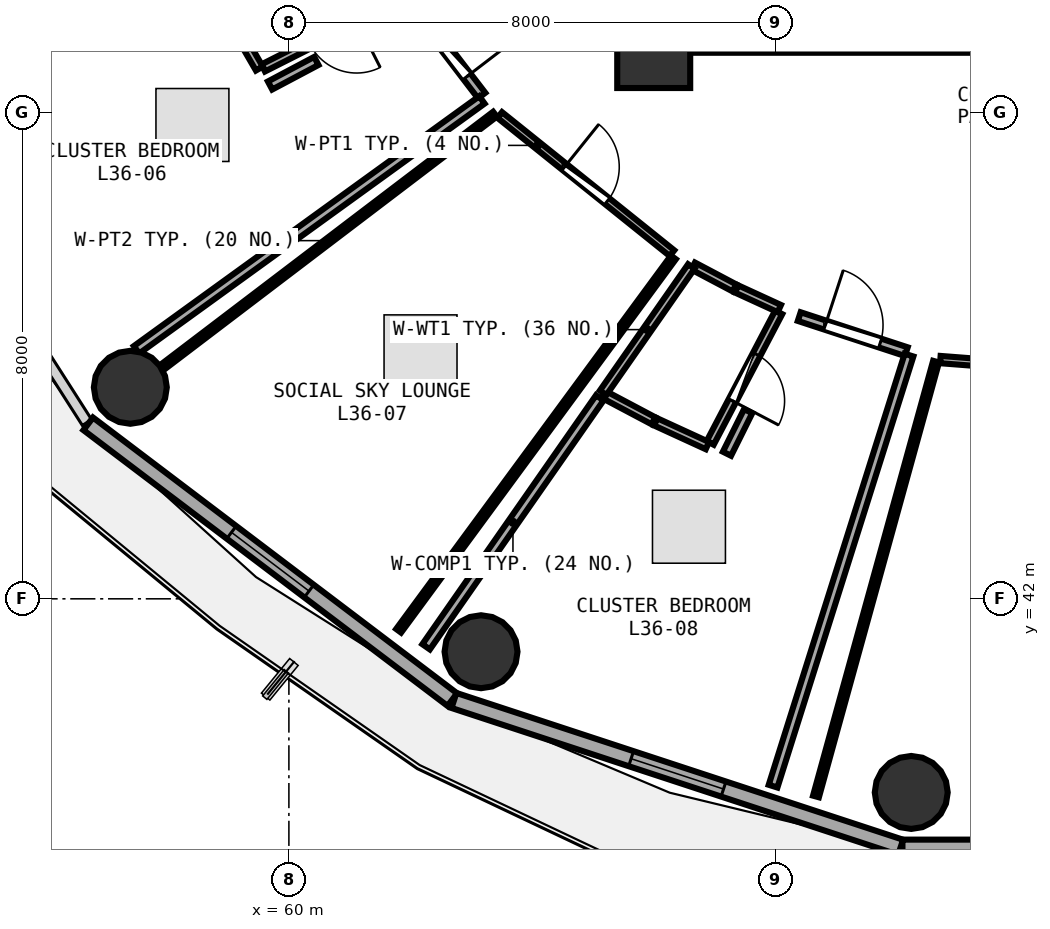
"""IFC4 building model, lengths in metres.
Left out: names, types, materials, properties, quantities, classifications, styles, units other than length and angle.
Written with IfcOpenShell. Run it as: python <this file> out.ifc"""

import sys

from ifc_helpers import new_model, si_unit, direction, frame, frame_2d, origin, origin_2d, place, context, subcontext, project, spatial, rectangle, circle, extrude, element, fill, save


model = new_model("IFC4")
c1 = context("Model", 3, precision=1e-05, world=origin(), true_north=direction((0.0, 1.0)))
c2 = subcontext(c1, "Body", "Model", "MODEL_VIEW")
j1 = project(units=[si_unit("LENGTHUNIT", "METRE"), si_unit("PLANEANGLEUNIT", "RADIAN")], contexts=[c1])
p1 = place(None, origin())
s1 = spatial("IfcSite", under=j1, at=p1, CompositionType="ELEMENT")
p2 = place(p1, origin())
s2 = spatial("IfcBuilding", under=s1, at=p2, CompositionType="ELEMENT")
p3 = place(p2, frame((0.0, 0.0, 143.1)))
s3 = spatial("IfcBuildingStorey", under=s2, at=p3, CompositionType="ELEMENT", Elevation=143.1)
p4 = place(p3, frame((66.0, 51.0, 0.0), z_axis=(0.0, 0.0, 1.0), x_axis=(1.0, 0.0, 0.0)))
e1 = element("IfcColumn", 1, at=p4, inside=s3, PredefinedType="PILASTER", context=c2, shape_type="SweptSolid", body=[
    extrude(rectangle(XDim=1.2, YDim=1.2, at=origin_2d()), origin(), (0.0, 0.0, 1.0), 3.75),
])
for number, where, z_axis, x_axis in (
    (2, (57.392, 45.479, 0.0), (0.0, 0.0, 1.0), (1.0, 0.0, 0.0)),
    (3, (63.16, 41.13, 0.0), (0.0, 0.0, 1.0), (1.0, 0.0, 0.0)),
    (4, (70.235, 38.816, 0.0), (0.0, 0.0, 1.0), (1.0, 0.0, 0.0)),
):
    element("IfcColumn", number, at=place(p3, frame(where, z_axis=z_axis, x_axis=x_axis)), inside=s3, PredefinedType="COLUMN", context=c2, shape_type="SweptSolid", body=[
        extrude(circle(Radius=0.6, at=origin_2d()), origin(), (0.0, 0.0, 1.0), 3.75),
    ])
p5 = place(p3, frame((56.699, 44.878, 0.0), z_axis=(0.0, 0.0, 1.0), x_axis=(0.797163719609, -0.603763202042, 0.0)))
e5 = element("IfcWall", 5, at=p5, inside=s3, PredefinedType="SOLIDWALL", context=c2, shape_type="SweptSolid", body=[
    extrude(rectangle(XDim=7.512, YDim=0.26, at=frame_2d((3.756, 0.0))), origin(), (0.0, 0.0, 1.0), 3.475),
])
p6 = place(p5, frame((2.956, 0.0, 0.85)))
e6 = element("IfcOpeningElement", 6, at=p6, cuts=e5, PredefinedType="OPENING", context=c2, shape_type="SweptSolid", body=[
    extrude(rectangle(XDim=1.6, YDim=1.45, at=frame_2d((0.8, 0.725))), frame((0.0, 0.14, 0.0), z_axis=(0.0, -1.0, 0.0), x_axis=(1.0, 0.0, 0.0)), (0.0, 0.0, 1.0), 0.28),
])
p7 = place(p3, frame((62.714, 40.328, 0.0), z_axis=(0.0, 0.0, 1.0), x_axis=(0.950038302428, -0.312133343173, 0.0)))
e7 = element("IfcWall", 7, at=p7, inside=s3, PredefinedType="SOLIDWALL", context=c2, shape_type="SweptSolid", body=[
    extrude(rectangle(XDim=7.733, YDim=0.26, at=frame_2d((3.867, 0.0))), origin(), (0.0, 0.0, 1.0), 3.475),
])
p8 = place(p7, frame((3.067, 0.0, 0.85)))
e8 = element("IfcOpeningElement", 8, at=p8, cuts=e7, PredefinedType="OPENING", context=c2, shape_type="SweptSolid", body=[
    extrude(rectangle(XDim=1.6, YDim=1.45, at=frame_2d((0.8, 0.725))), frame((0.0, 0.14, 0.0), z_axis=(0.0, -1.0, 0.0), x_axis=(1.0, 0.0, 0.0)), (0.0, 0.0, 1.0), 0.28),
])
p9 = place(p3, frame((70.091, 37.91, 0.0), z_axis=(0.0, 0.0, 1.0), x_axis=(1.0, 0.0, 0.0)))
e9 = element("IfcWall", 9, at=p9, inside=s3, PredefinedType="SOLIDWALL", context=c2, shape_type="SweptSolid", body=[
    extrude(rectangle(XDim=7.819, YDim=0.26, at=frame_2d((3.909, 0.0))), origin(), (0.0, 0.0, 1.0), 3.475),
])
p10 = place(p9, frame((3.434, 0.0, 0.0)))
e10 = element("IfcOpeningElement", 10, at=p10, cuts=e9, PredefinedType="OPENING", context=c2, shape_type="SweptSolid", body=[
    extrude(rectangle(XDim=0.95, YDim=2.1, at=frame_2d((0.475, 1.05))), frame((0.0, 0.14, 0.0), z_axis=(0.0, -1.0, 0.0), x_axis=(1.0, 0.0, 0.0)), (0.0, 0.0, 1.0), 0.28),
])
p11 = place(p9, frame((4.734, 0.0, 0.85)))
e11 = element("IfcOpeningElement", 11, at=p11, cuts=e9, PredefinedType="OPENING", context=c2, shape_type="SweptSolid", body=[
    extrude(rectangle(XDim=1.2, YDim=1.45, at=frame_2d((0.6, 0.725))), frame((0.0, 0.14, 0.0), z_axis=(0.0, -1.0, 0.0), x_axis=(1.0, 0.0, 0.0)), (0.0, 0.0, 1.0), 0.28),
])
p12 = place(p3, frame((66.26, 51.08, 0.0), z_axis=(0.0, 0.0, 1.0), x_axis=(1.0, 0.0, 0.0)))
e12 = element("IfcWall", 12, at=p12, inside=s3, PredefinedType="SHEAR", context=c2, shape_type="SweptSolid", body=[
    extrude(rectangle(XDim=7.16, YDim=0.2, at=frame_2d((3.58, 0.0))), origin(), (0.0, 0.0, 1.0), 3.49),
])
p13 = place(p3, frame((70.714, 45.934, 0.0), z_axis=(0.0, 0.0, 1.0), x_axis=(0.99702766625, -0.077044355613, 0.0)))
e13 = element("IfcWall", 13, at=p13, inside=s3, PredefinedType="PARTITIONING", context=c2, shape_type="SweptSolid", body=[
    extrude(rectangle(XDim=4.24, YDim=0.12, at=frame_2d((2.12, 0.0))), origin(), (0.0, 0.0, 1.0), 2.975),
])
p14 = place(p13, frame((1.67, 0.0, 0.0)))
e14 = element("IfcOpeningElement", 14, at=p14, cuts=e13, PredefinedType="OPENING", context=c2, shape_type="SweptSolid", body=[
    extrude(rectangle(XDim=0.9, YDim=2.08, at=frame_2d((0.45, 1.04))), frame((0.0, 0.07, 0.0), z_axis=(0.0, -1.0, 0.0), x_axis=(1.0, 0.0, 0.0)), (0.0, 0.0, 1.0), 0.14),
])
p15 = place(p3, frame((61.883, 51.895, 0.0), z_axis=(0.0, 0.0, 1.0), x_axis=(-0.892490597906, -0.451065995891, 0.0)))
e15 = element("IfcWall", 15, at=p15, inside=s3, PredefinedType="PLUMBINGWALL", context=c2, shape_type="SweptSolid", body=[
    extrude(rectangle(XDim=2.583, YDim=0.13, at=frame_2d((1.292, 0.0))), origin(), (0.0, 0.0, 1.0), 2.975),
])
p16 = place(p15, frame((0.861, 0.0, 0.0)))
e16 = element("IfcOpeningElement", 16, at=p16, cuts=e15, PredefinedType="OPENING", context=c2, shape_type="SweptSolid", body=[
    extrude(rectangle(XDim=0.86, YDim=2.05, at=frame_2d((0.43, 1.025))), frame((0.0, 0.075, 0.0), z_axis=(0.0, -1.0, 0.0), x_axis=(1.0, 0.0, 0.0)), (0.0, 0.0, 1.0), 0.15),
])
p17 = place(p3, frame((62.111, 51.658, 0.0), z_axis=(0.0, 0.0, 1.0), x_axis=(0.608307977949, -0.793701079729, 0.0)))
e17 = element("IfcWall", 17, at=p17, inside=s3, PredefinedType="PARTITIONING", context=c2, shape_type="SweptSolid", body=[
    extrude(rectangle(XDim=1.742, YDim=0.15, at=frame_2d((0.871, 0.0))), origin(), (0.0, 0.0, 1.0), 2.975),
])
p18 = place(p17, frame((0.396, 0.0, 0.0)))
e18 = element("IfcOpeningElement", 18, at=p18, cuts=e17, PredefinedType="OPENING", context=c2, shape_type="SweptSolid", body=[
    extrude(rectangle(XDim=0.95, YDim=2.08, at=frame_2d((0.475, 1.04))), frame((0.0, 0.085, 0.0), z_axis=(0.0, -1.0, 0.0), x_axis=(1.0, 0.0, 0.0)), (0.0, 0.0, 1.0), 0.17),
])
p19 = place(p3, frame((63.468, 49.957, 0.0), z_axis=(0.0, 0.0, 1.0), x_axis=(0.78006790059, -0.625694870099, 0.0)))
e19 = element("IfcWall", 19, at=p19, inside=s3, PredefinedType="PARTITIONING", context=c2, shape_type="SweptSolid", body=[
    extrude(rectangle(XDim=3.631, YDim=0.12, at=frame_2d((1.815, 0.0))), origin(), (0.0, 0.0, 1.0), 2.975),
])
p20 = place(p19, frame((1.366, 0.0, 0.0)))
e20 = element("IfcOpeningElement", 20, at=p20, cuts=e19, PredefinedType="OPENING", context=c2, shape_type="SweptSolid", body=[
    extrude(rectangle(XDim=0.9, YDim=2.08, at=frame_2d((0.45, 1.04))), frame((0.0, 0.07, 0.0), z_axis=(0.0, -1.0, 0.0), x_axis=(1.0, 0.0, 0.0)), (0.0, 0.0, 1.0), 0.14),
])
p21 = place(p3, frame((68.056, 46.712, 0.0), z_axis=(0.0, 0.0, 1.0), x_axis=(-0.464721454244, -0.885456927222, 0.0)))
e21 = element("IfcWall", 21, at=p21, inside=s3, PredefinedType="PLUMBINGWALL", context=c2, shape_type="SweptSolid", body=[
    extrude(rectangle(XDim=2.426, YDim=0.13, at=frame_2d((1.213, 0.0))), origin(), (0.0, 0.0, 1.0), 3.175),
])
p22 = place(p21, frame((0.783, 0.0, 0.0)))
e22 = element("IfcOpeningElement", 22, at=p22, cuts=e21, PredefinedType="OPENING", context=c2, shape_type="SweptSolid", body=[
    extrude(rectangle(XDim=0.86, YDim=2.05, at=frame_2d((0.43, 1.025))), frame((0.0, 0.075, 0.0), z_axis=(0.0, -1.0, 0.0), x_axis=(1.0, 0.0, 0.0)), (0.0, 0.0, 1.0), 0.15),
])
p23 = place(p3, frame((68.393, 46.641, 0.0), z_axis=(0.0, 0.0, 1.0), x_axis=(0.950343295829, -0.311203502668, 0.0)))
e23 = element("IfcWall", 23, at=p23, inside=s3, PredefinedType="PARTITIONING", context=c2, shape_type="SweptSolid", body=[
    extrude(rectangle(XDim=1.853, YDim=0.15, at=frame_2d((0.927, 0.0))), origin(), (0.0, 0.0, 1.0), 3.48),
])
p24 = place(p23, frame((0.451, 0.0, 0.0)))
e24 = element("IfcOpeningElement", 24, at=p24, cuts=e23, PredefinedType="OPENING", context=c2, shape_type="SweptSolid", body=[
    extrude(rectangle(XDim=0.95, YDim=2.08, at=frame_2d((0.475, 1.04))), frame((0.0, 0.085, 0.0), z_axis=(0.0, -1.0, 0.0), x_axis=(1.0, 0.0, 0.0)), (0.0, 0.0, 1.0), 0.17),
])
p25 = place(p3, frame((68.669, 38.75, 0.0), z_axis=(0.0, 0.0, 1.0), x_axis=(0.26617364863, 0.963925095002, 0.0)))
e25 = element("IfcWall", 25, at=p25, inside=s3, PredefinedType="PARTITIONING", context=c2, shape_type="SweptSolid", body=[
    extrude(rectangle(XDim=7.418, YDim=0.1, at=frame_2d((3.709, 0.0))), origin(), (0.0, 0.0, 1.0), 3.025),
])
p26 = place(p3, frame((59.514, 50.72, 0.0), z_axis=(0.0, 0.0, 1.0), x_axis=(-0.501222652689, 0.865318353227, 0.0)))
e26 = element("IfcWall", 26, at=p26, inside=s3, PredefinedType="PLUMBINGWALL", context=c2, shape_type="SweptSolid", body=[
    extrude(rectangle(XDim=0.878, YDim=0.13, at=frame_2d((0.439, 0.0))), origin(), (0.0, 0.0, 1.0), 2.975),
])
p27 = place(p3, frame((63.175, 50.205, 0.0), z_axis=(0.0, 0.0, 1.0), x_axis=(-0.810227225477, -0.586115895618, 0.0)))
e27 = element("IfcWall", 27, at=p27, inside=s3, PredefinedType="PARTITIONING", context=c2, shape_type="SweptSolid", body=[
    extrude(rectangle(XDim=7.011, YDim=0.15, at=frame_2d((3.506, 0.0))), origin(), (0.0, 0.0, 1.0), 3.175),
])
p28 = place(p3, frame((53.624, 50.438, 0.0), z_axis=(0.0, 0.0, 1.0), x_axis=(0.937175901168, 0.348857177468, 0.0)))
e28 = element("IfcWall", 28, at=p28, inside=s3, PredefinedType="PARTITIONING", context=c2, shape_type="SweptSolid", body=[
    extrude(rectangle(XDim=5.292, YDim=0.15, at=frame_2d((2.646, 0.0))), origin(), (0.0, 0.0, 1.0), 2.975),
])
p29 = place(p3, frame((59.69, 50.442, 0.0), z_axis=(0.0, 0.0, 1.0), x_axis=(0.883456769574, 0.468512685308, 0.0)))
e29 = element("IfcWall", 29, at=p29, inside=s3, PredefinedType="PARTITIONING", context=c2, shape_type="SweptSolid", body=[
    extrude(rectangle(XDim=0.861, YDim=0.15, at=frame_2d((0.431, 0.0))), origin(), (0.0, 0.0, 1.0), 3.48),
])
p30 = place(p3, frame((66.323, 47.615, 0.0), z_axis=(0.0, 0.0, 1.0), x_axis=(-0.592678959784, -0.805438793845, 0.0)))
e30 = element("IfcWall", 30, at=p30, inside=s3, PredefinedType="PARTITIONING", context=c2, shape_type="SweptSolid", body=[
    extrude(rectangle(XDim=7.624, YDim=0.1, at=frame_2d((3.812, 0.0))), origin(), (0.0, 0.0, 1.0), 2.975),
])
p31 = place(p3, frame((57.921, 45.811, 0.0), z_axis=(0.0, 0.0, 1.0), x_axis=(0.79595600815, 0.60535446896, 0.0)))
e31 = element("IfcWall", 31, at=p31, inside=s3, PredefinedType="PARTITIONING", context=c2, shape_type="SweptSolid", body=[
    extrude(rectangle(XDim=6.869, YDim=0.1, at=frame_2d((3.435, 0.0))), origin(), (0.0, 0.0, 1.0), 2.975),
])
p32 = place(p3, frame((66.648, 47.473, 0.0), z_axis=(0.0, 0.0, 1.0), x_axis=(0.884034960309, -0.467420783611, 0.0)))
e32 = element("IfcWall", 32, at=p32, inside=s3, PredefinedType="PLUMBINGWALL", context=c2, shape_type="SweptSolid", body=[
    extrude(rectangle(XDim=0.769, YDim=0.13, at=frame_2d((0.384, 0.0))), origin(), (0.0, 0.0, 1.0), 3.235),
])
p33 = place(p3, frame((67.363, 47.096, 0.0), z_axis=(0.0, 0.0, 1.0), x_axis=(0.908835433781, -0.417154832531, 0.0)))
e33 = element("IfcWall", 33, at=p33, inside=s3, PredefinedType="PLUMBINGWALL", context=c2, shape_type="SweptSolid", body=[
    extrude(rectangle(XDim=0.773, YDim=0.13, at=frame_2d((0.387, 0.0))), origin(), (0.0, 0.0, 1.0), 3.235),
])
p34 = place(p3, frame((66.883, 44.519, 0.0), z_axis=(0.0, 0.0, 1.0), x_axis=(-0.90885062215, 0.417121740763, 0.0)))
e34 = element("IfcWall", 34, at=p34, inside=s3, PredefinedType="PLUMBINGWALL", context=c2, shape_type="SweptSolid", body=[
    extrude(rectangle(XDim=0.936, YDim=0.13, at=frame_2d((0.468, 0.0))), origin(), (0.0, 0.0, 1.0), 3.175),
])
p35 = place(p3, frame((65.996, 44.927, 0.0), z_axis=(0.0, 0.0, 1.0), x_axis=(-0.88373041627, 0.46799631554, 0.0)))
e35 = element("IfcWall", 35, at=p35, inside=s3, PredefinedType="PLUMBINGWALL", context=c2, shape_type="SweptSolid", body=[
    extrude(rectangle(XDim=0.93, YDim=0.13, at=frame_2d((0.465, 0.0))), origin(), (0.0, 0.0, 1.0), 3.175),
])
p36 = place(p3, frame((65.168, 45.388, 0.0), z_axis=(0.0, 0.0, 1.0), x_axis=(0.572452908282, 0.819937599943, 0.0)))
e36 = element("IfcWall", 36, at=p36, inside=s3, PredefinedType="PLUMBINGWALL", context=c2, shape_type="SweptSolid", body=[
    extrude(rectangle(XDim=2.533, YDim=0.13, at=frame_2d((1.267, 0.0))), origin(), (0.0, 0.0, 1.0), 3.235),
])
p37 = place(p3, frame((70.199, 46.008, 0.0), z_axis=(0.0, 0.0, 1.0), x_axis=(-0.300834252316, -0.953676440222, 0.0)))
e37 = element("IfcWall", 37, at=p37, inside=s3, PredefinedType="PARTITIONING", context=c2, shape_type="SweptSolid", body=[
    extrude(rectangle(XDim=7.433, YDim=0.15, at=frame_2d((3.716, 0.0))), origin(), (0.0, 0.0, 1.0), 3.025),
])
p38 = place(p3, frame((62.257, 41.211, 0.0), z_axis=(0.0, 0.0, 1.0), x_axis=(0.572125752908, 0.820165911789, 0.0)))
e38 = element("IfcWall", 38, at=p38, inside=s3, PredefinedType="PARTITIONING", context=c2, shape_type="SweptSolid", body=[
    extrude(rectangle(XDim=4.992, YDim=0.15, at=frame_2d((2.496, 0.0))), origin(), (0.0, 0.0, 1.0), 2.975),
])
p39 = place(p3, frame((67.205, 44.386, 0.0), z_axis=(0.0, 0.0, 1.0), x_axis=(0.445215718224, 0.89542334359, 0.0)))
e39 = element("IfcWall", 39, at=p39, inside=s3, PredefinedType="PARTITIONING", context=c2, shape_type="SweptSolid", body=[
    extrude(rectangle(XDim=0.782, YDim=0.15, at=frame_2d((0.391, 0.0))), origin(), (0.0, 0.0, 1.0), 3.175),
])
p40 = place(p6, origin())
e40 = element("IfcWindow", 40, at=p40, inside=s3, PartitioningType="SINGLE_PANEL", PredefinedType="WINDOW", context=c2, shape_type="SweptSolid", body=[
    extrude(rectangle(XDim=1.6, YDim=1.45, at=frame_2d((0.8, 0.725))), frame((0.0, 0.03, 0.0), z_axis=(0.0, -1.0, 0.0), x_axis=(1.0, 0.0, 0.0)), (0.0, 0.0, 1.0), 0.06),
])
fill(e6, e40)
p41 = place(p8, origin())
e41 = element("IfcWindow", 41, at=p41, inside=s3, PartitioningType="SINGLE_PANEL", PredefinedType="WINDOW", context=c2, shape_type="SweptSolid", body=[
    extrude(rectangle(XDim=1.6, YDim=1.45, at=frame_2d((0.8, 0.725))), frame((0.0, 0.03, 0.0), z_axis=(0.0, -1.0, 0.0), x_axis=(1.0, 0.0, 0.0)), (0.0, 0.0, 1.0), 0.06),
])
fill(e8, e41)
p42 = place(p18, origin())
e42 = element("IfcDoor", 42, at=p42, inside=s3, OperationType="SINGLE_SWING_RIGHT", PredefinedType="DOOR", context=c2, shape_type="SweptSolid", body=[
    extrude(rectangle(XDim=0.95, YDim=2.08, at=frame_2d((0.475, 1.04))), frame((0.0, 0.025, 0.0), z_axis=(0.0, -1.0, 0.0), x_axis=(1.0, 0.0, 0.0)), (0.0, 0.0, 1.0), 0.05),
])
fill(e18, e42)
p43 = place(p20, origin())
e43 = element("IfcDoor", 43, at=p43, inside=s3, OperationType="SINGLE_SWING_LEFT", PredefinedType="DOOR", context=c2, shape_type="SweptSolid", body=[
    extrude(rectangle(XDim=0.9, YDim=2.08, at=frame_2d((0.45, 1.04))), frame((0.0, 0.025, 0.0), z_axis=(0.0, -1.0, 0.0), x_axis=(1.0, 0.0, 0.0)), (0.0, 0.0, 1.0), 0.05),
])
fill(e20, e43)
p44 = place(p22, origin())
e44 = element("IfcDoor", 44, at=p44, inside=s3, OperationType="SINGLE_SWING_RIGHT", PredefinedType="DOOR", context=c2, shape_type="SweptSolid", body=[
    extrude(rectangle(XDim=0.86, YDim=2.05, at=frame_2d((0.43, 1.025))), frame((0.0, 0.025, 0.0), z_axis=(0.0, -1.0, 0.0), x_axis=(1.0, 0.0, 0.0)), (0.0, 0.0, 1.0), 0.05),
])
fill(e22, e44)
p45 = place(p24, origin())
e45 = element("IfcDoor", 45, at=p45, inside=s3, OperationType="SINGLE_SWING_LEFT", PredefinedType="DOOR", context=c2, shape_type="SweptSolid", body=[
    extrude(rectangle(XDim=0.95, YDim=2.08, at=frame_2d((0.475, 1.04))), frame((0.0, 0.025, 0.0), z_axis=(0.0, -1.0, 0.0), x_axis=(1.0, 0.0, 0.0)), (0.0, 0.0, 1.0), 0.05),
])
fill(e24, e45)
save(model, sys.argv[1])
